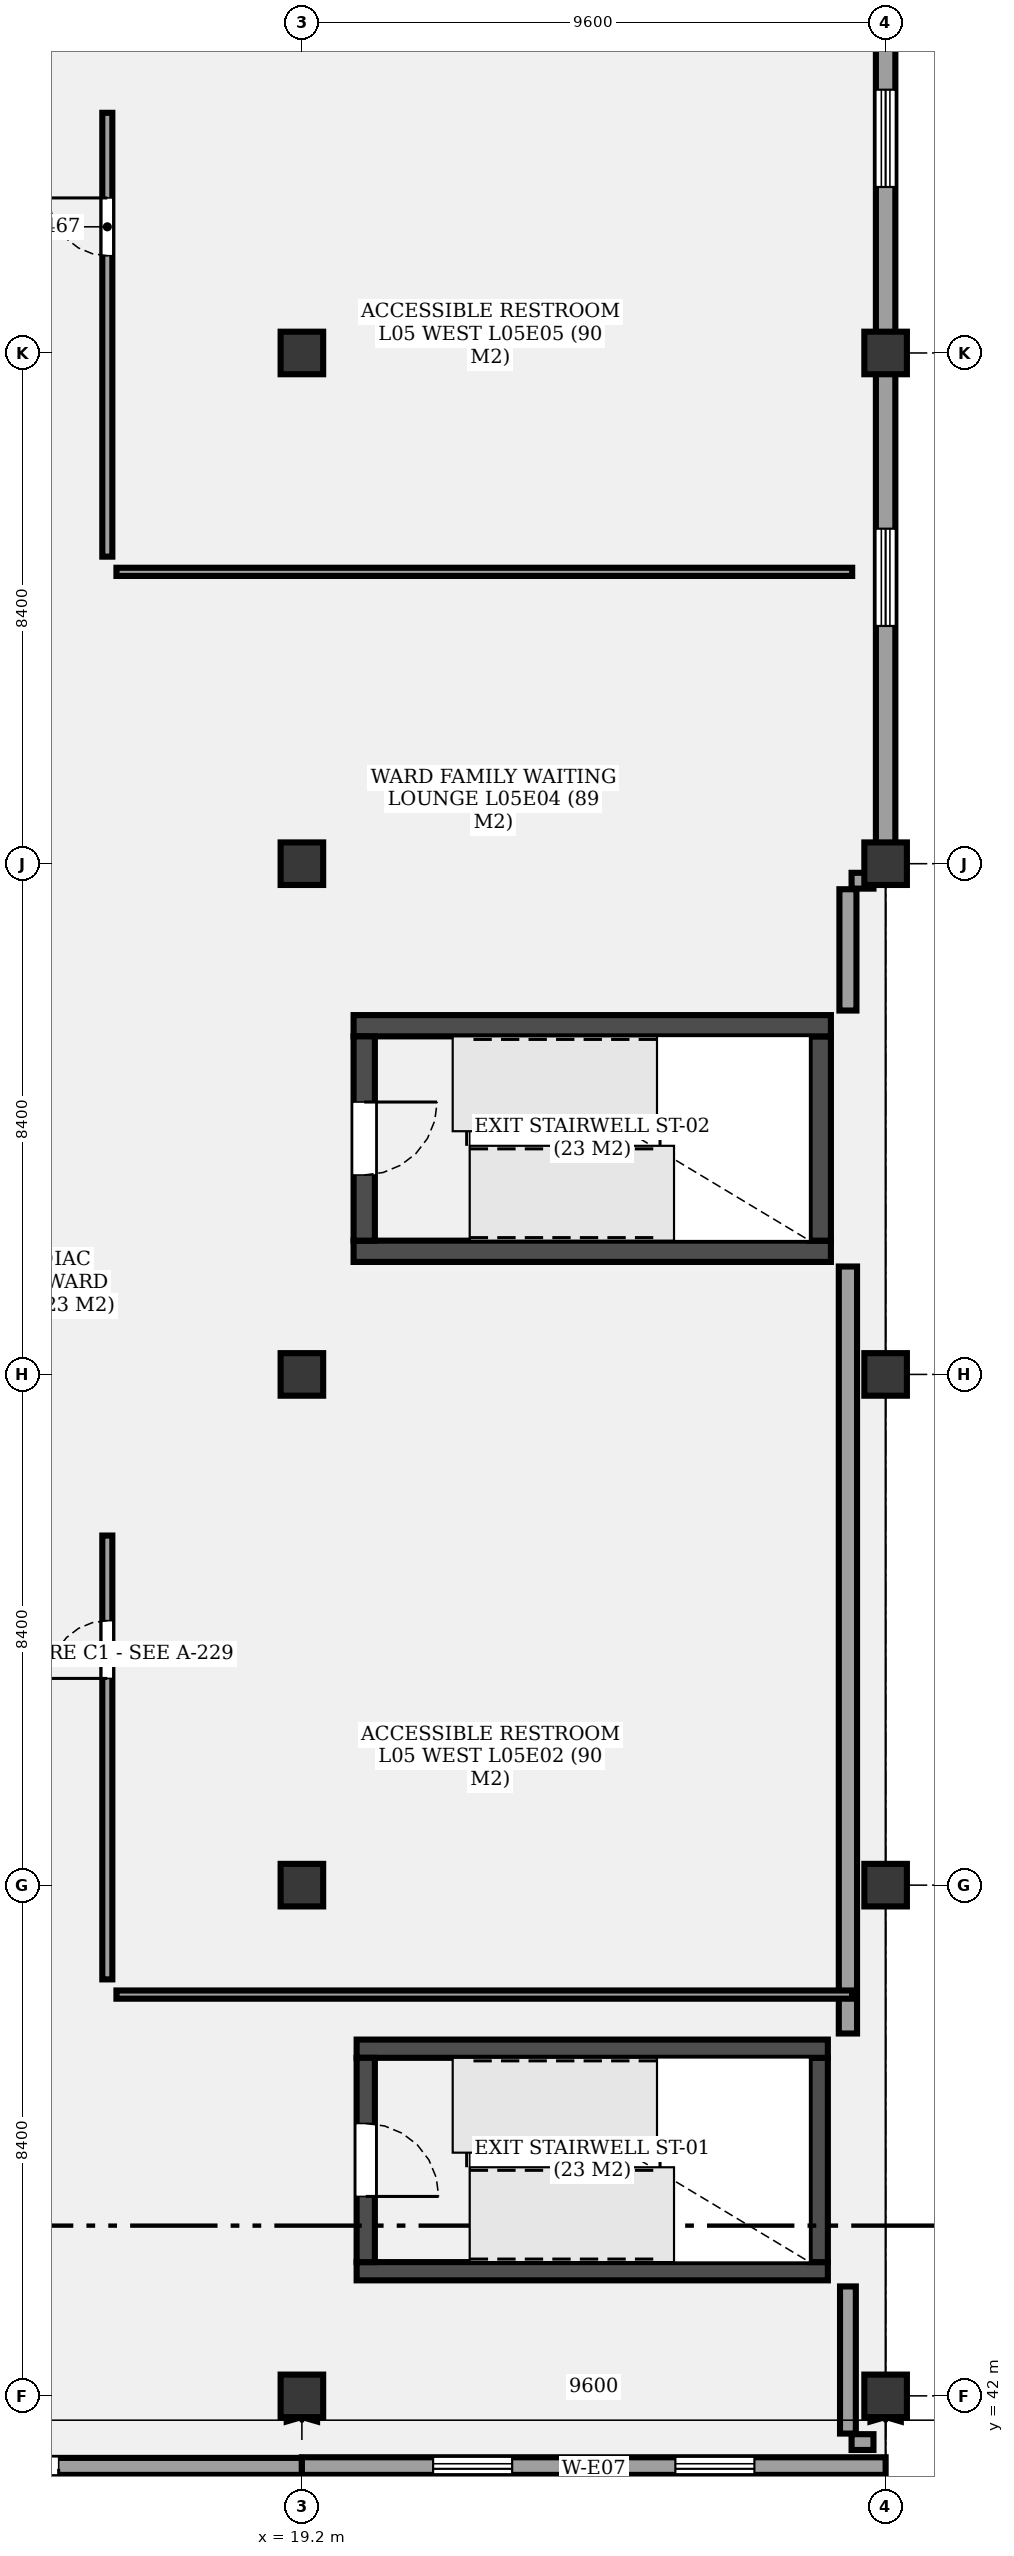
"""IFC4 building model, lengths in metres.
Left out: names, types, materials, properties, quantities, classifications, styles, units other than length and angle.
Written with IfcOpenShell. Run it as: python <this file> out.ifc"""

import sys

from ifc_helpers import new_model, si_unit, direction, frame, frame_2d, origin, origin_2d, place, context, subcontext, project, spatial, rectangle, extrude, element, fill, save


model = new_model("IFC4")
c1 = context("Model", 3, precision=1e-05, world=origin(), true_north=direction((0.0, 1.0)))
c2 = subcontext(c1, "Body", "Model", "MODEL_VIEW")
j1 = project(units=[si_unit("LENGTHUNIT", "METRE"), si_unit("PLANEANGLEUNIT", "RADIAN")], contexts=[c1])
p1 = place(None, origin())
s1 = spatial("IfcSite", under=j1, at=p1, CompositionType="ELEMENT")
p2 = place(p1, origin())
s2 = spatial("IfcBuilding", under=s1, at=p2, CompositionType="ELEMENT")
p3 = place(p2, frame((0.0, 0.0, 22.0)))
s3 = spatial("IfcBuildingStorey", under=s2, at=p3, CompositionType="ELEMENT", Elevation=22.0)
for number, where, z_axis, x_axis in (
    (1, (19.2, 42.0, 0.0), (0.0, 0.0, 1.0), (1.0, 0.0, 0.0)),
    (2, (19.2, 50.4, 0.0), (0.0, 0.0, 1.0), (1.0, 0.0, 0.0)),
    (3, (19.2, 58.8, 0.0), (0.0, 0.0, 1.0), (1.0, 0.0, 0.0)),
    (4, (19.2, 67.2, 0.0), (0.0, 0.0, 1.0), (1.0, 0.0, 0.0)),
    (5, (19.2, 75.6, 0.0), (0.0, 0.0, 1.0), (1.0, 0.0, 0.0)),
    (6, (28.8, 42.0, 0.0), (0.0, 0.0, 1.0), (1.0, 0.0, 0.0)),
    (7, (28.8, 50.4, 0.0), (0.0, 0.0, 1.0), (1.0, 0.0, 0.0)),
    (8, (28.8, 58.8, 0.0), (0.0, 0.0, 1.0), (1.0, 0.0, 0.0)),
    (9, (28.8, 67.2, 0.0), (0.0, 0.0, 1.0), (1.0, 0.0, 0.0)),
    (10, (28.8, 75.6, 0.0), (0.0, 0.0, 1.0), (1.0, 0.0, 0.0)),
):
    element("IfcColumn", number, at=place(p3, frame(where, z_axis=z_axis, x_axis=x_axis)), inside=s3, PredefinedType="COLUMN", context=c2, shape_type="SweptSolid", body=[
        extrude(rectangle(XDim=0.7, YDim=0.7, at=origin_2d()), origin(), (0.0, 0.0, 1.0), 4.2),
    ])
p4 = place(p3, frame((20.1, 44.05, 0.0), z_axis=(0.0, 0.0, 1.0), x_axis=(1.0, 0.0, 0.0)))
e11 = element("IfcWall", 11, at=p4, inside=s3, PredefinedType="SHEAR", context=c2, shape_type="SweptSolid", body=[
    extrude(rectangle(XDim=7.75, YDim=0.3, at=frame_2d((3.875, 0.0))), origin(), (0.0, 0.0, 1.0), 4.2),
])
p5 = place(p3, frame((27.7, 44.2, 0.0), z_axis=(0.0, 0.0, 1.0), x_axis=(0.0, 1.0, 0.0)))
e12 = element("IfcWall", 12, at=p5, inside=s3, PredefinedType="SHEAR", context=c2, shape_type="SweptSolid", body=[
    extrude(rectangle(XDim=3.36, YDim=0.3, at=frame_2d((1.68, 0.0))), origin(), (0.0, 0.0, 1.0), 4.2),
])
p6 = place(p3, frame((27.85, 47.71, 0.0), z_axis=(0.0, 0.0, 1.0), x_axis=(-1.0, 0.0, 0.0)))
e13 = element("IfcWall", 13, at=p6, inside=s3, PredefinedType="SHEAR", context=c2, shape_type="SweptSolid", body=[
    extrude(rectangle(XDim=7.75, YDim=0.3, at=frame_2d((3.875, 0.0))), origin(), (0.0, 0.0, 1.0), 4.2),
])
p7 = place(p3, frame((20.25, 47.56, 0.0), z_axis=(0.0, 0.0, 1.0), x_axis=(0.0, -1.0, 0.0)))
e14 = element("IfcWall", 14, at=p7, inside=s3, PredefinedType="SHEAR", context=c2, shape_type="SweptSolid", body=[
    extrude(rectangle(XDim=3.36, YDim=0.3, at=frame_2d((1.68, 0.0))), origin(), (0.0, 0.0, 1.0), 4.2),
])
p8 = place(p7, frame((1.08, 0.0, 0.0)))
e15 = element("IfcOpeningElement", 15, at=p8, cuts=e14, PredefinedType="OPENING", context=c2, shape_type="SweptSolid", body=[
    extrude(rectangle(XDim=1.2, YDim=2.2, at=frame_2d((0.6, 1.1))), frame((0.0, 0.16, 0.0), z_axis=(0.0, -1.0, 0.0), x_axis=(1.0, 0.0, 0.0)), (0.0, 0.0, 1.0), 0.32),
])
p9 = place(p3, frame((20.05, 60.825, 0.0), z_axis=(0.0, 0.0, 1.0), x_axis=(1.0, 0.0, 0.0)))
e16 = element("IfcWall", 16, at=p9, inside=s3, PredefinedType="SHEAR", context=c2, shape_type="SweptSolid", body=[
    extrude(rectangle(XDim=7.85, YDim=0.35, at=frame_2d((3.925, 0.0))), origin(), (0.0, 0.0, 1.0), 4.2),
])
p10 = place(p3, frame((27.725, 61.0, 0.0), z_axis=(0.0, 0.0, 1.0), x_axis=(0.0, 1.0, 0.0)))
e17 = element("IfcWall", 17, at=p10, inside=s3, PredefinedType="SHEAR", context=c2, shape_type="SweptSolid", body=[
    extrude(rectangle(XDim=3.36, YDim=0.35, at=frame_2d((1.68, 0.0))), origin(), (0.0, 0.0, 1.0), 4.2),
])
p11 = place(p3, frame((27.9, 64.535, 0.0), z_axis=(0.0, 0.0, 1.0), x_axis=(-1.0, 0.0, 0.0)))
e18 = element("IfcWall", 18, at=p11, inside=s3, PredefinedType="SHEAR", context=c2, shape_type="SweptSolid", body=[
    extrude(rectangle(XDim=7.85, YDim=0.35, at=frame_2d((3.925, 0.0))), origin(), (0.0, 0.0, 1.0), 4.2),
])
p12 = place(p3, frame((20.225, 64.36, 0.0), z_axis=(0.0, 0.0, 1.0), x_axis=(0.0, -1.0, 0.0)))
e19 = element("IfcWall", 19, at=p12, inside=s3, PredefinedType="SHEAR", context=c2, shape_type="SweptSolid", body=[
    extrude(rectangle(XDim=3.36, YDim=0.35, at=frame_2d((1.68, 0.0))), origin(), (0.0, 0.0, 1.0), 4.2),
])
p13 = place(p12, frame((1.08, 0.0, 0.0)))
e20 = element("IfcOpeningElement", 20, at=p13, cuts=e19, PredefinedType="OPENING", context=c2, shape_type="SweptSolid", body=[
    extrude(rectangle(XDim=1.2, YDim=2.2, at=frame_2d((0.6, 1.1))), frame((0.0, 0.185, 0.0), z_axis=(0.0, -1.0, 0.0), x_axis=(1.0, 0.0, 0.0)), (0.0, 0.0, 1.0), 0.37),
])
p14 = place(p3, frame((19.2, 40.8, 0.0), z_axis=(0.0, 0.0, 1.0), x_axis=(-1.0, 0.0, 0.0)))
e21 = element("IfcWall", 21, at=p14, inside=s3, PredefinedType="SOLIDWALL", context=c2, shape_type="SweptSolid", body=[
    extrude(rectangle(XDim=9.6, YDim=0.36, at=frame_2d((4.8, 0.0))), origin(), (0.0, 0.0, 1.0), 3.39),
])
p15 = place(p14, frame((4.0, 0.0, 0.0)))
e22 = element("IfcOpeningElement", 22, at=p15, cuts=e21, PredefinedType="OPENING", context=c2, shape_type="SweptSolid", body=[
    extrude(rectangle(XDim=1.6, YDim=2.3, at=frame_2d((0.8, 1.15))), frame((0.0, 0.19, 0.0), z_axis=(0.0, -1.0, 0.0), x_axis=(1.0, 0.0, 0.0)), (0.0, 0.0, 1.0), 0.38),
])
p16 = place(p3, frame((28.8, 40.8, 0.0), z_axis=(0.0, 0.0, 1.0), x_axis=(-1.0, 0.0, 0.0)))
e23 = element("IfcWall", 23, at=p16, inside=s3, PredefinedType="SOLIDWALL", context=c2, shape_type="SweptSolid", body=[
    extrude(rectangle(XDim=9.6, YDim=0.38, at=frame_2d((4.8, 0.0))), origin(), (0.0, 0.0, 1.0), 3.39),
])
p17 = place(p16, frame((2.158, 0.0, 0.85)))
e24 = element("IfcOpeningElement", 24, at=p17, cuts=e23, PredefinedType="OPENING", context=c2, shape_type="SweptSolid", body=[
    extrude(rectangle(XDim=1.3, YDim=1.4, at=frame_2d((0.65, 0.7))), frame((0.0, 0.2, 0.0), z_axis=(0.0, -1.0, 0.0), x_axis=(1.0, 0.0, 0.0)), (0.0, 0.0, 1.0), 0.4),
])
p18 = place(p16, frame((6.142, 0.0, 0.85)))
e25 = element("IfcOpeningElement", 25, at=p18, cuts=e23, PredefinedType="OPENING", context=c2, shape_type="SweptSolid", body=[
    extrude(rectangle(XDim=1.3, YDim=1.4, at=frame_2d((0.65, 0.7))), frame((0.0, 0.2, 0.0), z_axis=(0.0, -1.0, 0.0), x_axis=(1.0, 0.0, 0.0)), (0.0, 0.0, 1.0), 0.4),
])
for number, where, z_axis, x_axis in (
    (26, (28.6, 66.92, 0.0), (0.0, 0.0, 1.0), (-1.0, 0.0, 0.0)),
    (27, (28.6, 41.24, 0.0), (0.0, 0.0, 1.0), (-1.0, 0.0, 0.0)),
):
    element("IfcWall", number, at=place(p3, frame(where, z_axis=z_axis, x_axis=x_axis)), inside=s3, PredefinedType="SOLIDWALL", context=c2, shape_type="SweptSolid", body=[
        extrude(rectangle(XDim=0.36, YDim=0.26, at=frame_2d((0.18, 0.0))), origin(), (0.0, 0.0, 1.0), 3.39),
    ])
p19 = place(p3, frame((28.18, 43.8, 0.0), z_axis=(0.0, 0.0, 1.0), x_axis=(0.0, -1.0, 0.0)))
e28 = element("IfcWall", 28, at=p19, inside=s3, PredefinedType="SOLIDWALL", context=c2, shape_type="SweptSolid", body=[
    extrude(rectangle(XDim=2.42, YDim=0.26, at=frame_2d((1.21, 0.0))), origin(), (0.0, 0.0, 1.0), 3.39),
])
p20 = place(p3, frame((28.18, 66.78, 0.0), z_axis=(0.0, 0.0, 1.0), x_axis=(0.0, -1.0, 0.0)))
e29 = element("IfcWall", 29, at=p20, inside=s3, PredefinedType="SOLIDWALL", context=c2, shape_type="SweptSolid", body=[
    extrude(rectangle(XDim=1.995, YDim=0.28, at=frame_2d((0.998, 0.0))), origin(), (0.0, 0.0, 1.0), 3.39),
])
p21 = place(p3, frame((28.18, 60.575, 0.0), z_axis=(0.0, 0.0, 1.0), x_axis=(0.0, -1.0, 0.0)))
e30 = element("IfcWall", 30, at=p21, inside=s3, PredefinedType="SOLIDWALL", context=c2, shape_type="SweptSolid", body=[
    extrude(rectangle(XDim=12.615, YDim=0.3, at=frame_2d((6.308, 0.0))), origin(), (0.0, 0.0, 1.0), 3.39),
])
p22 = place(p3, frame((28.8, 83.84, 0.0), z_axis=(0.0, 0.0, 1.0), x_axis=(0.0, -1.0, 0.0)))
e31 = element("IfcWall", 31, at=p22, inside=s3, PredefinedType="SOLIDWALL", context=c2, shape_type="SweptSolid", body=[
    extrude(rectangle(XDim=16.64, YDim=0.32, at=frame_2d((8.32, 0.0))), origin(), (0.0, 0.0, 1.0), 3.39),
])
p23 = place(p22, frame((3.91, 0.0, 0.85)))
e32 = element("IfcOpeningElement", 32, at=p23, cuts=e31, PredefinedType="OPENING", context=c2, shape_type="SweptSolid", body=[
    extrude(rectangle(XDim=1.6, YDim=1.4, at=frame_2d((0.8, 0.7))), frame((0.0, 0.17, 0.0), z_axis=(0.0, -1.0, 0.0), x_axis=(1.0, 0.0, 0.0)), (0.0, 0.0, 1.0), 0.34),
])
p24 = place(p22, frame((11.13, 0.0, 0.85)))
e33 = element("IfcOpeningElement", 33, at=p24, cuts=e31, PredefinedType="OPENING", context=c2, shape_type="SweptSolid", body=[
    extrude(rectangle(XDim=1.6, YDim=1.4, at=frame_2d((0.8, 0.7))), frame((0.0, 0.17, 0.0), z_axis=(0.0, -1.0, 0.0), x_axis=(1.0, 0.0, 0.0)), (0.0, 0.0, 1.0), 0.34),
])
p25 = place(p3, frame((16.0, 48.85, 0.0), z_axis=(0.0, 0.0, 1.0), x_axis=(0.0, 1.0, 0.0)))
e34 = element("IfcWall", 34, at=p25, inside=s3, PredefinedType="PARTITIONING", context=c2, shape_type="SweptSolid", body=[
    extrude(rectangle(XDim=7.3, YDim=0.165, at=frame_2d((3.65, 0.0))), origin(), (0.0, 0.0, 1.0), 3.3),
])
p26 = place(p25, frame((4.95, 0.0, 0.0)))
e35 = element("IfcOpeningElement", 35, at=p26, cuts=e34, PredefinedType="OPENING", context=c2, shape_type="SweptSolid", body=[
    extrude(rectangle(XDim=0.95, YDim=2.1, at=frame_2d((0.475, 1.05))), frame((0.0, 0.093, 0.0), z_axis=(0.0, -1.0, 0.0), x_axis=(1.0, 0.0, 0.0)), (0.0, 0.0, 1.0), 0.185),
])
p27 = place(p3, frame((16.15, 48.6, 0.0), z_axis=(0.0, 0.0, 1.0), x_axis=(1.0, 0.0, 0.0)))
e36 = element("IfcWall", 36, at=p27, inside=s3, PredefinedType="PARTITIONING", context=c2, shape_type="SweptSolid", body=[
    extrude(rectangle(XDim=12.1, YDim=0.135, at=frame_2d((6.05, 0.0))), origin(), (0.0, 0.0, 1.0), 3.3),
])
p28 = place(p3, frame((16.0, 72.25, 0.0), z_axis=(0.0, 0.0, 1.0), x_axis=(0.0, 1.0, 0.0)))
e37 = element("IfcWall", 37, at=p28, inside=s3, PredefinedType="PARTITIONING", context=c2, shape_type="SweptSolid", body=[
    extrude(rectangle(XDim=7.3, YDim=0.165, at=frame_2d((3.65, 0.0))), origin(), (0.0, 0.0, 1.0), 3.3),
])
p29 = place(p28, frame((4.95, 0.0, 0.0)))
e38 = element("IfcOpeningElement", 38, at=p29, cuts=e37, PredefinedType="OPENING", context=c2, shape_type="SweptSolid", body=[
    extrude(rectangle(XDim=0.95, YDim=2.1, at=frame_2d((0.475, 1.05))), frame((0.0, 0.093, 0.0), z_axis=(0.0, -1.0, 0.0), x_axis=(1.0, 0.0, 0.0)), (0.0, 0.0, 1.0), 0.185),
])
p30 = place(p3, frame((16.15, 72.0, 0.0), z_axis=(0.0, 0.0, 1.0), x_axis=(1.0, 0.0, 0.0)))
e39 = element("IfcWall", 39, at=p30, inside=s3, PredefinedType="PARTITIONING", context=c2, shape_type="SweptSolid", body=[
    extrude(rectangle(XDim=12.1, YDim=0.135, at=frame_2d((6.05, 0.0))), origin(), (0.0, 0.0, 1.0), 3.3),
])
p31 = place(p8, origin())
e40 = element("IfcDoor", 40, at=p31, inside=s3, OperationType="SINGLE_SWING_RIGHT", PredefinedType="DOOR", context=c2, shape_type="SweptSolid", body=[
    extrude(rectangle(XDim=1.2, YDim=2.2, at=frame_2d((0.6, 1.1))), frame((0.0, 0.025, 0.0), z_axis=(0.0, -1.0, 0.0), x_axis=(1.0, 0.0, 0.0)), (0.0, 0.0, 1.0), 0.05),
])
fill(e15, e40)
p32 = place(p13, origin())
e41 = element("IfcDoor", 41, at=p32, inside=s3, OperationType="SINGLE_SWING_LEFT", PredefinedType="DOOR", context=c2, shape_type="SweptSolid", body=[
    extrude(rectangle(XDim=1.2, YDim=2.2, at=frame_2d((0.6, 1.1))), frame((0.0, 0.025, 0.0), z_axis=(0.0, -1.0, 0.0), x_axis=(1.0, 0.0, 0.0)), (0.0, 0.0, 1.0), 0.05),
])
fill(e20, e41)
p33 = place(p15, origin())
e42 = element("IfcDoor", 42, at=p33, inside=s3, OperationType="SINGLE_SWING_LEFT", PredefinedType="DOOR", context=c2, shape_type="SweptSolid", body=[
    extrude(rectangle(XDim=1.6, YDim=2.3, at=frame_2d((0.8, 1.15))), frame((0.0, 0.025, 0.0), z_axis=(0.0, -1.0, 0.0), x_axis=(1.0, 0.0, 0.0)), (0.0, 0.0, 1.0), 0.05),
])
fill(e22, e42)
p34 = place(p17, origin())
e43 = element("IfcWindow", 43, at=p34, inside=s3, PartitioningType="SINGLE_PANEL", PredefinedType="WINDOW", context=c2, shape_type="SweptSolid", body=[
    extrude(rectangle(XDim=1.3, YDim=1.4, at=frame_2d((0.65, 0.7))), frame((0.0, 0.03, 0.0), z_axis=(0.0, -1.0, 0.0), x_axis=(1.0, 0.0, 0.0)), (0.0, 0.0, 1.0), 0.06),
])
fill(e24, e43)
p35 = place(p18, origin())
e44 = element("IfcWindow", 44, at=p35, inside=s3, PartitioningType="SINGLE_PANEL", PredefinedType="WINDOW", context=c2, shape_type="SweptSolid", body=[
    extrude(rectangle(XDim=1.3, YDim=1.4, at=frame_2d((0.65, 0.7))), frame((0.0, 0.03, 0.0), z_axis=(0.0, -1.0, 0.0), x_axis=(1.0, 0.0, 0.0)), (0.0, 0.0, 1.0), 0.06),
])
fill(e25, e44)
p36 = place(p23, origin())
e45 = element("IfcWindow", 45, at=p36, inside=s3, PartitioningType="SINGLE_PANEL", PredefinedType="WINDOW", context=c2, shape_type="SweptSolid", body=[
    extrude(rectangle(XDim=1.6, YDim=1.4, at=frame_2d((0.8, 0.7))), frame((0.0, 0.03, 0.0), z_axis=(0.0, -1.0, 0.0), x_axis=(1.0, 0.0, 0.0)), (0.0, 0.0, 1.0), 0.06),
])
fill(e32, e45)
p37 = place(p24, origin())
e46 = element("IfcWindow", 46, at=p37, inside=s3, PartitioningType="SINGLE_PANEL", PredefinedType="WINDOW", context=c2, shape_type="SweptSolid", body=[
    extrude(rectangle(XDim=1.6, YDim=1.4, at=frame_2d((0.8, 0.7))), frame((0.0, 0.03, 0.0), z_axis=(0.0, -1.0, 0.0), x_axis=(1.0, 0.0, 0.0)), (0.0, 0.0, 1.0), 0.06),
])
fill(e33, e46)
p38 = place(p26, origin())
e47 = element("IfcDoor", 47, at=p38, inside=s3, OperationType="SINGLE_SWING_LEFT", PredefinedType="DOOR", context=c2, shape_type="SweptSolid", body=[
    extrude(rectangle(XDim=0.95, YDim=2.1, at=frame_2d((0.475, 1.05))), frame((0.0, 0.025, 0.0), z_axis=(0.0, -1.0, 0.0), x_axis=(1.0, 0.0, 0.0)), (0.0, 0.0, 1.0), 0.05),
])
fill(e35, e47)
p39 = place(p29, origin())
e48 = element("IfcDoor", 48, at=p39, inside=s3, OperationType="SINGLE_SWING_RIGHT", PredefinedType="DOOR", context=c2, shape_type="SweptSolid", body=[
    extrude(rectangle(XDim=0.95, YDim=2.1, at=frame_2d((0.475, 1.05))), frame((0.0, 0.025, 0.0), z_axis=(0.0, -1.0, 0.0), x_axis=(1.0, 0.0, 0.0)), (0.0, 0.0, 1.0), 0.05),
])
fill(e38, e48)
save(model, sys.argv[1])
